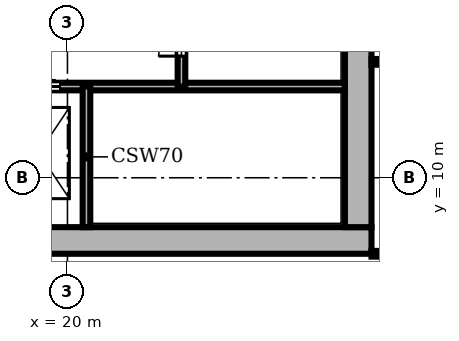
"""IFC4 building model, lengths in metres.
Left out: names, types, materials, properties, quantities, classifications, styles, units other than length and angle.
Written with IfcOpenShell. Run it as: python <this file> out.ifc"""

import sys

from ifc_helpers import new_model, si_unit, direction, frame, frame_2d, origin, place, context, subcontext, project, spatial, rectangle, extrude, element, fill, save


model = new_model("IFC4")
c1 = context("Model", 3, precision=1e-05, world=origin(), true_north=direction((0.0, 1.0)))
c2 = subcontext(c1, "Body", "Model", "MODEL_VIEW")
j1 = project(units=[si_unit("LENGTHUNIT", "METRE"), si_unit("PLANEANGLEUNIT", "RADIAN")], contexts=[c1])
p1 = place(None, origin())
s1 = spatial("IfcSite", under=j1, at=p1, CompositionType="ELEMENT")
p2 = place(p1, origin())
s2 = spatial("IfcBuilding", under=s1, at=p2, CompositionType="ELEMENT")
p3 = place(p2, frame((0.0, 0.0, 213.6)))
s3 = spatial("IfcBuildingStorey", under=s2, at=p3, CompositionType="ELEMENT", Elevation=213.6)
p4 = place(p3, frame((8.0, 8.35, 0.0), z_axis=(0.0, 0.0, 1.0), x_axis=(1.0, 0.0, 0.0)))
e1 = element("IfcWall", 1, at=p4, inside=s3, PredefinedType="SHEAR", context=c2, shape_type="SweptSolid", body=[
    extrude(rectangle(XDim=20.0, YDim=0.7, at=frame_2d((10.0, 0.0))), origin(), (0.0, 0.0, 1.0), 3.9),
])
p5 = place(p3, frame((27.65, 8.7, 0.0), z_axis=(0.0, 0.0, 1.0), x_axis=(0.0, 1.0, 0.0)))
e2 = element("IfcWall", 2, at=p5, inside=s3, PredefinedType="SHEAR", context=c2, shape_type="SweptSolid", body=[
    extrude(rectangle(XDim=18.6, YDim=0.7, at=frame_2d((9.3, 0.0))), origin(), (0.0, 0.0, 1.0), 3.9),
])
p6 = place(p5, frame((4.75, 0.0, 0.0)))
e3 = element("IfcOpeningElement", 3, at=p6, cuts=e2, PredefinedType="OPENING", context=c2, shape_type="SweptSolid", body=[
    extrude(rectangle(XDim=1.6, YDim=2.1, at=frame_2d((0.8, 1.05))), frame((0.0, 0.36, 0.0), z_axis=(0.0, -1.0, 0.0), x_axis=(1.0, 0.0, 0.0)), (0.0, 0.0, 1.0), 0.72),
])
p7 = place(p3, frame((13.8, 12.4, 0.0), z_axis=(0.0, 0.0, 1.0), x_axis=(1.0, 0.0, 0.0)))
e4 = element("IfcWall", 4, at=p7, inside=s3, PredefinedType="SHEAR", context=c2, shape_type="SweptSolid", body=[
    extrude(rectangle(XDim=13.5, YDim=0.2, at=frame_2d((6.75, 0.0))), origin(), (0.0, 0.0, 1.0), 3.58),
])
p8 = place(p7, frame((2.4, 0.0, 0.0)))
e5 = element("IfcOpeningElement", 5, at=p8, cuts=e4, PredefinedType="OPENING", context=c2, shape_type="SweptSolid", body=[
    extrude(rectangle(XDim=1.1, YDim=2.1, at=frame_2d((0.55, 1.05))), frame((0.0, 0.11, 0.0), z_axis=(0.0, -1.0, 0.0), x_axis=(1.0, 0.0, 0.0)), (0.0, 0.0, 1.0), 0.22),
])
p9 = place(p7, frame((4.9, 0.0, 0.0)))
e6 = element("IfcOpeningElement", 6, at=p9, cuts=e4, PredefinedType="OPENING", context=c2, shape_type="SweptSolid", body=[
    extrude(rectangle(XDim=1.1, YDim=2.1, at=frame_2d((0.55, 1.05))), frame((0.0, 0.11, 0.0), z_axis=(0.0, -1.0, 0.0), x_axis=(1.0, 0.0, 0.0)), (0.0, 0.0, 1.0), 0.22),
])
p10 = place(p7, frame((0.2, 0.0, 0.0)))
e7 = element("IfcOpeningElement", 7, at=p10, cuts=e4, PredefinedType="OPENING", context=c2, shape_type="SweptSolid", body=[
    extrude(rectangle(XDim=1.0, YDim=2.1, at=frame_2d((0.5, 1.05))), frame((0.0, 0.11, 0.0), z_axis=(0.0, -1.0, 0.0), x_axis=(1.0, 0.0, 0.0)), (0.0, 0.0, 1.0), 0.22),
])
p11 = place(p3, frame((20.5, 8.7, 0.0), z_axis=(0.0, 0.0, 1.0), x_axis=(0.0, 1.0, 0.0)))
e8 = element("IfcWall", 8, at=p11, inside=s3, PredefinedType="SHEAR", context=c2, shape_type="SweptSolid", body=[
    extrude(rectangle(XDim=3.7, YDim=0.2, at=frame_2d((1.85, 0.0))), origin(), (0.0, 0.0, 1.0), 3.58),
])
p12 = place(p3, frame((23.0, 12.4, 0.0), z_axis=(0.0, 0.0, 1.0), x_axis=(0.0, 1.0, 0.0)))
e9 = element("IfcWall", 9, at=p12, inside=s3, PredefinedType="SHEAR", context=c2, shape_type="SweptSolid", body=[
    extrude(rectangle(XDim=2.8, YDim=0.2, at=frame_2d((1.4, 0.0))), origin(), (0.0, 0.0, 1.0), 3.58),
])
p13 = place(p12, frame((0.8, 0.0, 0.0)))
e10 = element("IfcOpeningElement", 10, at=p13, cuts=e9, PredefinedType="OPENING", context=c2, shape_type="SweptSolid", body=[
    extrude(rectangle(XDim=1.2, YDim=2.1, at=frame_2d((0.6, 1.05))), frame((0.0, 0.11, 0.0), z_axis=(0.0, -1.0, 0.0), x_axis=(1.0, 0.0, 0.0)), (0.0, 0.0, 1.0), 0.22),
])
for number, where, z_axis, x_axis in (
    (11, (28.0, 8.0, 0.0), (0.0, 0.0, 1.0), (1.0, 0.0, 0.0)),
    (12, (28.0, 13.05, 0.0), (0.0, 0.0, 1.0), (1.0, 0.0, 0.0)),
):
    element("IfcWall", number, at=place(p3, frame(where, z_axis=z_axis, x_axis=x_axis)), inside=s3, PredefinedType="PARTITIONING", context=c2, shape_type="SweptSolid", body=[
        extrude(rectangle(XDim=2.799, YDim=0.15, at=frame_2d((1.399, 0.0))), origin(), (0.0, 0.0, 1.0), 3.58),
    ])
p14 = place(p9, origin())
e13 = element("IfcDoor", 13, at=p14, inside=s3, OperationType="DOUBLE_DOOR_SLIDING", PredefinedType="DOOR", context=c2, shape_type="SweptSolid", body=[
    extrude(rectangle(XDim=1.1, YDim=2.1, at=frame_2d((0.55, 1.05))), frame((0.0, 0.025, 0.0), z_axis=(0.0, -1.0, 0.0), x_axis=(1.0, 0.0, 0.0)), (0.0, 0.0, 1.0), 0.05),
])
fill(e6, e13)
p15 = place(p13, origin())
e14 = element("IfcDoor", 14, at=p15, inside=s3, OperationType="DOUBLE_DOOR_SINGLE_SWING", PredefinedType="DOOR", context=c2, shape_type="SweptSolid", body=[
    extrude(rectangle(XDim=1.2, YDim=2.1, at=frame_2d((0.6, 1.05))), frame((0.0, 0.025, 0.0), z_axis=(0.0, -1.0, 0.0), x_axis=(1.0, 0.0, 0.0)), (0.0, 0.0, 1.0), 0.05),
])
fill(e10, e14)
save(model, sys.argv[1])
